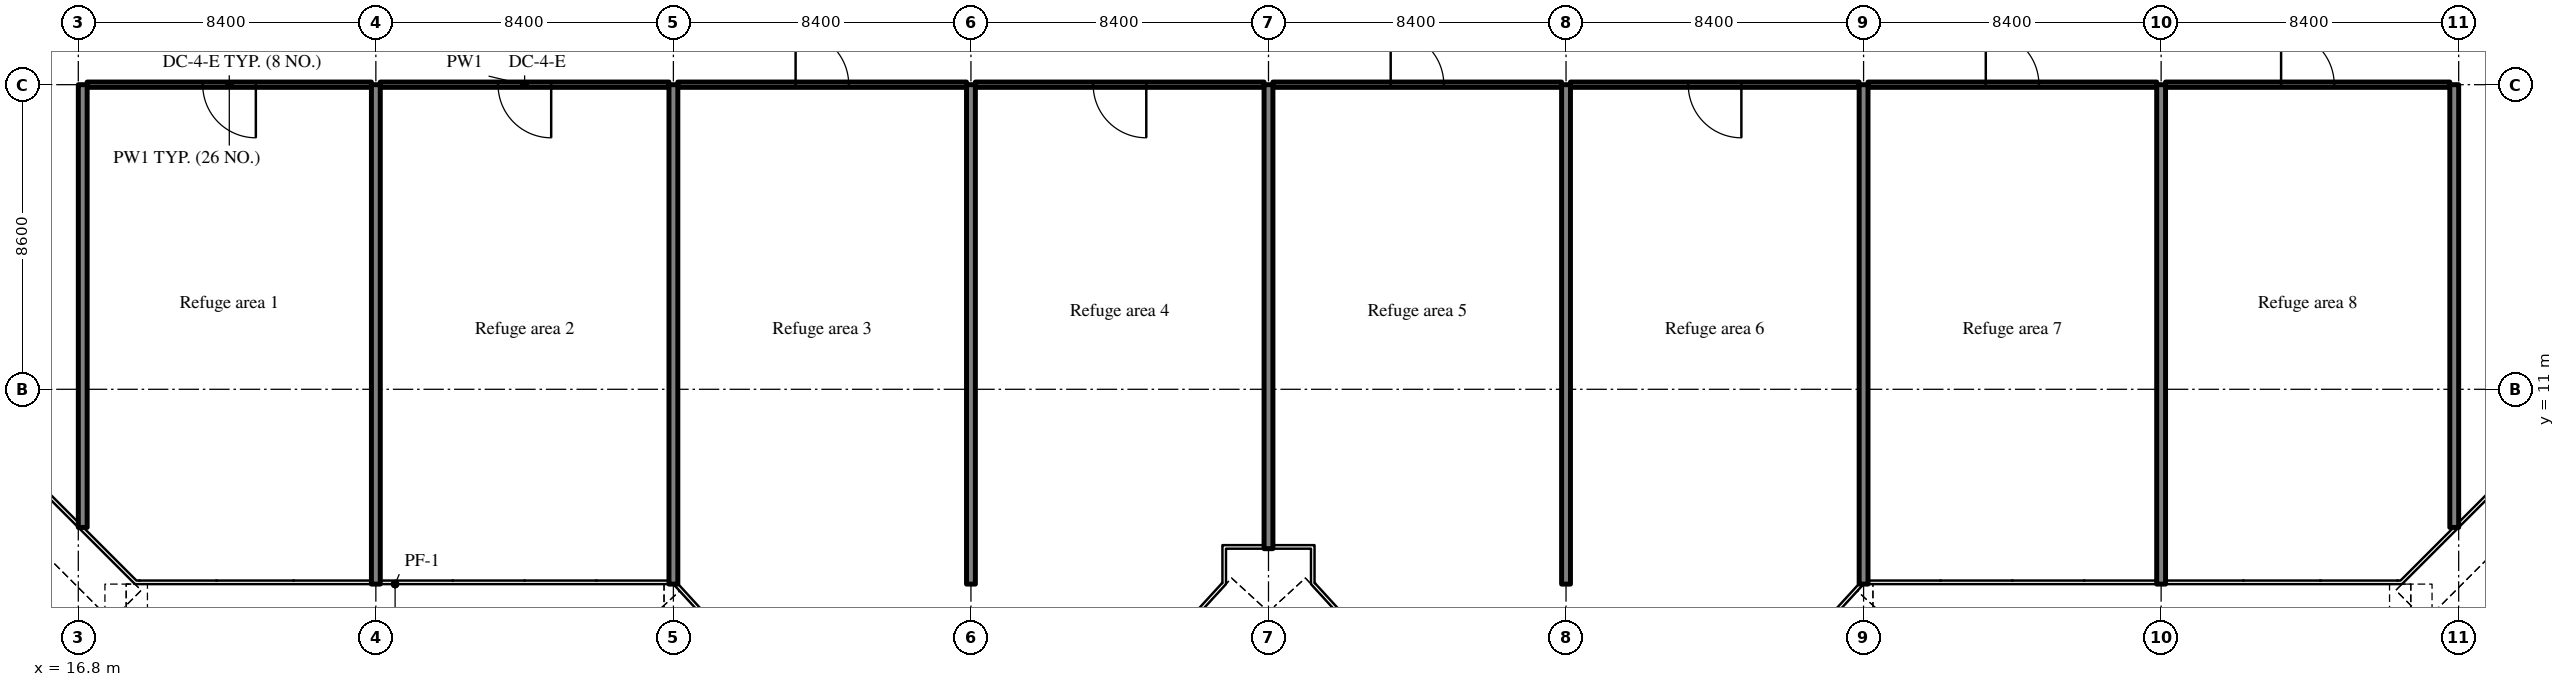
"""IFC4 building model, lengths in metres.
Left out: names, types, materials, properties, quantities, classifications, styles, units other than length and angle.
Written with IfcOpenShell. Run it as: python <this file> out.ifc"""

import sys

from ifc_helpers import new_model, si_unit, direction, frame, frame_2d, origin, place, context, subcontext, project, spatial, rectangle, extrude, source, transform, mapped, element, fill, save


model = new_model("IFC4")
c1 = context("Model", 3, precision=1e-05, world=origin(), true_north=direction((0.0, 1.0)))
c2 = subcontext(c1, "Body", "Model", "MODEL_VIEW")
j1 = project(units=[si_unit("LENGTHUNIT", "METRE"), si_unit("PLANEANGLEUNIT", "RADIAN")], contexts=[c1])
p1 = place(None, origin())
s1 = spatial("IfcSite", under=j1, at=p1, CompositionType="ELEMENT")
p2 = place(p1, origin())
s2 = spatial("IfcBuilding", under=s1, at=p2, CompositionType="ELEMENT")
p3 = place(p2, frame((0.0, 0.0, 270.1)))
s3 = spatial("IfcBuildingStorey", under=s2, at=p3, CompositionType="ELEMENT", Elevation=270.1)
m1 = source(origin(), c2, "Body", "SweptSolid", [
    extrude(rectangle(XDim=12.5, YDim=0.25, at=frame_2d((6.25, 0.0))), origin(), (0.0, 0.0, 1.0), 7.32),
])
p4 = place(p3, frame((16.925, 7.1, 0.0), z_axis=(0.0, 0.0, 1.0), x_axis=(0.0, 1.0, 0.0)))
e1 = element("IfcWall", 1, at=p4, inside=s3, PredefinedType="SHEAR", context=c2, shape_type="MappedRepresentation", body=[
    mapped(m1, transform((0.0, 0.0, 0.0), scale=1.0)),
])
m2 = source(origin(), c2, "Body", "SweptSolid", [
    extrude(rectangle(XDim=14.1, YDim=0.25, at=frame_2d((7.05, 0.0))), origin(), (0.0, 0.0, 1.0), 7.32),
])
for number, where, z_axis, x_axis in (
    (2, (25.2, 5.5, 0.0), (0.0, 0.0, 1.0), (0.0, 1.0, 0.0)),
    (3, (33.6, 5.5, 0.0), (0.0, 0.0, 1.0), (0.0, 1.0, 0.0)),
    (4, (42.0, 5.5, 0.0), (0.0, 0.0, 1.0), (0.0, 1.0, 0.0)),
):
    element("IfcWall", number, at=place(p3, frame(where, z_axis=z_axis, x_axis=x_axis)), inside=s3, PredefinedType="SHEAR", context=c2, shape_type="MappedRepresentation", body=[
        mapped(m2, transform((0.0, 0.0, 0.0), scale=1.0)),
    ])
m3 = source(origin(), c2, "Body", "SweptSolid", [
    extrude(rectangle(XDim=13.1, YDim=0.25, at=frame_2d((6.55, 0.0))), origin(), (0.0, 0.0, 1.0), 7.32),
])
p5 = place(p3, frame((50.4, 6.5, 0.0), z_axis=(0.0, 0.0, 1.0), x_axis=(0.0, 1.0, 0.0)))
e5 = element("IfcWall", 5, at=p5, inside=s3, PredefinedType="SHEAR", context=c2, shape_type="MappedRepresentation", body=[
    mapped(m3, transform((0.0, 0.0, 0.0), scale=1.0)),
])
for number, where, z_axis, x_axis in (
    (6, (58.8, 5.5, 0.0), (0.0, 0.0, 1.0), (0.0, 1.0, 0.0)),
    (7, (67.2, 5.5, 0.0), (0.0, 0.0, 1.0), (0.0, 1.0, 0.0)),
    (8, (75.6, 5.5, 0.0), (0.0, 0.0, 1.0), (0.0, 1.0, 0.0)),
):
    element("IfcWall", number, at=place(p3, frame(where, z_axis=z_axis, x_axis=x_axis)), inside=s3, PredefinedType="SHEAR", context=c2, shape_type="MappedRepresentation", body=[
        mapped(m2, transform((0.0, 0.0, 0.0), scale=1.0)),
    ])
p6 = place(p3, frame((83.875, 7.1, 0.0), z_axis=(0.0, 0.0, 1.0), x_axis=(0.0, 1.0, 0.0)))
e9 = element("IfcWall", 9, at=p6, inside=s3, PredefinedType="SHEAR", context=c2, shape_type="MappedRepresentation", body=[
    mapped(m1, transform((0.0, 0.0, 0.0), scale=1.0)),
])
m4 = source(origin(), c2, "Body", "SweptSolid", [
    extrude(rectangle(XDim=8.025, YDim=0.15, at=frame_2d((4.012, 0.0))), origin(), (0.0, 0.0, 1.0), 6.57),
])
p7 = place(p3, frame((17.05, 19.6, 0.0), z_axis=(0.0, 0.0, 1.0), x_axis=(1.0, 0.0, 0.0)))
e10 = element("IfcWall", 10, at=p7, inside=s3, PredefinedType="PARTITIONING", context=c2, shape_type="MappedRepresentation", body=[
    mapped(m4, transform((0.0, 0.0, 0.0), scale=1.0)),
])
m5 = source(origin(), c2, "Body", "SweptSolid", [
    extrude(rectangle(XDim=1.5, YDim=2.1, at=frame_2d((0.75, 1.05))), frame((0.0, 0.085, 0.0), z_axis=(0.0, -1.0, 0.0), x_axis=(1.0, 0.0, 0.0)), (0.0, 0.0, 1.0), 0.17),
])
p8 = place(p7, frame((3.262, 0.0, 0.0)))
e11 = element("IfcOpeningElement", 11, at=p8, cuts=e10, PredefinedType="OPENING", context=c2, shape_type="MappedRepresentation", body=[
    mapped(m5, transform((0.0, 0.0, 0.0), scale=1.0)),
])
m6 = source(origin(), c2, "Body", "SweptSolid", [
    extrude(rectangle(XDim=8.15, YDim=0.15, at=frame_2d((4.075, 0.0))), origin(), (0.0, 0.0, 1.0), 6.57),
])
p9 = place(p3, frame((25.325, 19.6, 0.0), z_axis=(0.0, 0.0, 1.0), x_axis=(1.0, 0.0, 0.0)))
e12 = element("IfcWall", 12, at=p9, inside=s3, PredefinedType="PARTITIONING", context=c2, shape_type="MappedRepresentation", body=[
    mapped(m6, transform((0.0, 0.0, 0.0), scale=1.0)),
])
p10 = place(p9, frame((3.325, 0.0, 0.0)))
e13 = element("IfcOpeningElement", 13, at=p10, cuts=e12, PredefinedType="OPENING", context=c2, shape_type="MappedRepresentation", body=[
    mapped(m5, transform((0.0, 0.0, 0.0), scale=1.0)),
])
m7 = source(origin(), c2, "Body", "SweptSolid", [
    extrude(rectangle(XDim=8.15, YDim=0.15, at=frame_2d((4.075, 0.0))), origin(), (0.0, 0.0, 1.0), 6.57),
])
p11 = place(p3, frame((33.725, 19.6, 0.0), z_axis=(0.0, 0.0, 1.0), x_axis=(1.0, 0.0, 0.0)))
e14 = element("IfcWall", 14, at=p11, inside=s3, PredefinedType="PARTITIONING", context=c2, shape_type="MappedRepresentation", body=[
    mapped(m7, transform((0.0, 0.0, 0.0), scale=1.0)),
])
p12 = place(p11, frame((3.325, 0.0, 0.0)))
e15 = element("IfcOpeningElement", 15, at=p12, cuts=e14, PredefinedType="OPENING", context=c2, shape_type="MappedRepresentation", body=[
    mapped(m5, transform((0.0, 0.0, 0.0), scale=1.0)),
])
p13 = place(p3, frame((42.125, 19.6, 0.0), z_axis=(0.0, 0.0, 1.0), x_axis=(1.0, 0.0, 0.0)))
e16 = element("IfcWall", 16, at=p13, inside=s3, PredefinedType="PARTITIONING", context=c2, shape_type="MappedRepresentation", body=[
    mapped(m7, transform((0.0, 0.0, 0.0), scale=1.0)),
])
p14 = place(p13, frame((3.325, 0.0, 0.0)))
e17 = element("IfcOpeningElement", 17, at=p14, cuts=e16, PredefinedType="OPENING", context=c2, shape_type="MappedRepresentation", body=[
    mapped(m5, transform((0.0, 0.0, 0.0), scale=1.0)),
])
p15 = place(p3, frame((50.525, 19.6, 0.0), z_axis=(0.0, 0.0, 1.0), x_axis=(1.0, 0.0, 0.0)))
e18 = element("IfcWall", 18, at=p15, inside=s3, PredefinedType="PARTITIONING", context=c2, shape_type="MappedRepresentation", body=[
    mapped(m6, transform((0.0, 0.0, 0.0), scale=1.0)),
])
p16 = place(p15, frame((3.325, 0.0, 0.0)))
e19 = element("IfcOpeningElement", 19, at=p16, cuts=e18, PredefinedType="OPENING", context=c2, shape_type="MappedRepresentation", body=[
    mapped(m5, transform((0.0, 0.0, 0.0), scale=1.0)),
])
p17 = place(p3, frame((58.925, 19.6, 0.0), z_axis=(0.0, 0.0, 1.0), x_axis=(1.0, 0.0, 0.0)))
e20 = element("IfcWall", 20, at=p17, inside=s3, PredefinedType="PARTITIONING", context=c2, shape_type="MappedRepresentation", body=[
    mapped(m7, transform((0.0, 0.0, 0.0), scale=1.0)),
])
p18 = place(p17, frame((3.325, 0.0, 0.0)))
e21 = element("IfcOpeningElement", 21, at=p18, cuts=e20, PredefinedType="OPENING", context=c2, shape_type="MappedRepresentation", body=[
    mapped(m5, transform((0.0, 0.0, 0.0), scale=1.0)),
])
p19 = place(p3, frame((67.325, 19.6, 0.0), z_axis=(0.0, 0.0, 1.0), x_axis=(1.0, 0.0, 0.0)))
e22 = element("IfcWall", 22, at=p19, inside=s3, PredefinedType="PARTITIONING", context=c2, shape_type="MappedRepresentation", body=[
    mapped(m6, transform((0.0, 0.0, 0.0), scale=1.0)),
])
p20 = place(p19, frame((3.325, 0.0, 0.0)))
e23 = element("IfcOpeningElement", 23, at=p20, cuts=e22, PredefinedType="OPENING", context=c2, shape_type="MappedRepresentation", body=[
    mapped(m5, transform((0.0, 0.0, 0.0), scale=1.0)),
])
p21 = place(p3, frame((75.725, 19.6, 0.0), z_axis=(0.0, 0.0, 1.0), x_axis=(1.0, 0.0, 0.0)))
e24 = element("IfcWall", 24, at=p21, inside=s3, PredefinedType="PARTITIONING", context=c2, shape_type="MappedRepresentation", body=[
    mapped(m4, transform((0.0, 0.0, 0.0), scale=1.0)),
])
p22 = place(p21, frame((3.262, 0.0, 0.0)))
e25 = element("IfcOpeningElement", 25, at=p22, cuts=e24, PredefinedType="OPENING", context=c2, shape_type="MappedRepresentation", body=[
    mapped(m5, transform((0.0, 0.0, 0.0), scale=1.0)),
])
m8 = source(origin(), c2, "Body", "SweptSolid", [
    extrude(rectangle(XDim=1.5, YDim=2.1, at=frame_2d((0.75, 1.05))), frame((0.0, 0.025, 0.0), z_axis=(0.0, -1.0, 0.0), x_axis=(1.0, 0.0, 0.0)), (0.0, 0.0, 1.0), 0.05),
])
p23 = place(p8, origin())
e26 = element("IfcDoor", 26, at=p23, inside=s3, OperationType="SINGLE_SWING_RIGHT", PredefinedType="DOOR", context=c2, shape_type="MappedRepresentation", body=[
    mapped(m8, transform((0.0, 0.0, 0.0), scale=1.0)),
])
fill(e11, e26)
p24 = place(p10, origin())
e27 = element("IfcDoor", 27, at=p24, inside=s3, OperationType="SINGLE_SWING_RIGHT", PredefinedType="DOOR", context=c2, shape_type="MappedRepresentation", body=[
    mapped(m8, transform((0.0, 0.0, 0.0), scale=1.0)),
])
fill(e13, e27)
p25 = place(p12, origin())
e28 = element("IfcDoor", 28, at=p25, inside=s3, OperationType="SINGLE_SWING_LEFT", PredefinedType="DOOR", context=c2, shape_type="MappedRepresentation", body=[
    mapped(m8, transform((0.0, 0.0, 0.0), scale=1.0)),
])
fill(e15, e28)
p26 = place(p14, origin())
e29 = element("IfcDoor", 29, at=p26, inside=s3, OperationType="SINGLE_SWING_RIGHT", PredefinedType="DOOR", context=c2, shape_type="MappedRepresentation", body=[
    mapped(m8, transform((0.0, 0.0, 0.0), scale=1.0)),
])
fill(e17, e29)
p27 = place(p16, origin())
e30 = element("IfcDoor", 30, at=p27, inside=s3, OperationType="SINGLE_SWING_LEFT", PredefinedType="DOOR", context=c2, shape_type="MappedRepresentation", body=[
    mapped(m8, transform((0.0, 0.0, 0.0), scale=1.0)),
])
fill(e19, e30)
p28 = place(p18, origin())
e31 = element("IfcDoor", 31, at=p28, inside=s3, OperationType="SINGLE_SWING_RIGHT", PredefinedType="DOOR", context=c2, shape_type="MappedRepresentation", body=[
    mapped(m8, transform((0.0, 0.0, 0.0), scale=1.0)),
])
fill(e21, e31)
p29 = place(p20, origin())
e32 = element("IfcDoor", 32, at=p29, inside=s3, OperationType="SINGLE_SWING_LEFT", PredefinedType="DOOR", context=c2, shape_type="MappedRepresentation", body=[
    mapped(m8, transform((0.0, 0.0, 0.0), scale=1.0)),
])
fill(e23, e32)
p30 = place(p22, origin())
e33 = element("IfcDoor", 33, at=p30, inside=s3, OperationType="SINGLE_SWING_LEFT", PredefinedType="DOOR", context=c2, shape_type="MappedRepresentation", body=[
    mapped(m8, transform((0.0, 0.0, 0.0), scale=1.0)),
])
fill(e25, e33)
save(model, sys.argv[1])
